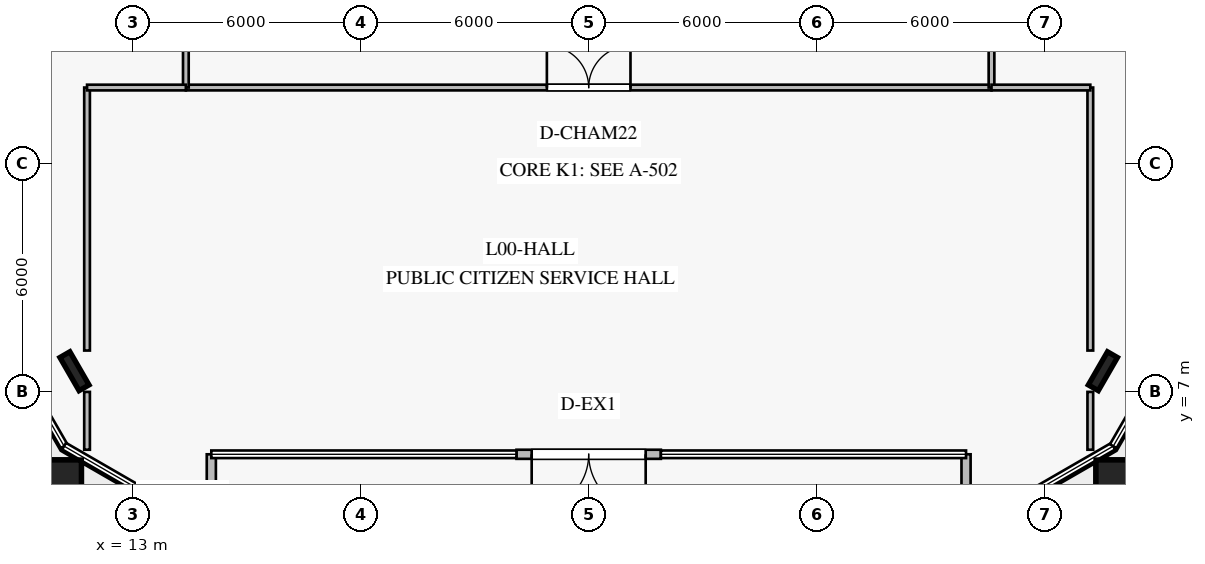
"""IFC4 building model, lengths in metres.
Left out: names, types, materials, properties, quantities, classifications, styles, units other than length and angle.
Written with IfcOpenShell. Run it as: python <this file> out.ifc"""

import sys

from ifc_helpers import new_model, si_unit, direction, frame, frame_2d, origin, origin_2d, place, context, subcontext, project, spatial, rectangle, i_section, extrude, element, fill, save


model = new_model("IFC4")
c1 = context("Model", 3, precision=1e-05, world=origin(), true_north=direction((0.0, 1.0)))
c2 = subcontext(c1, "Body", "Model", "MODEL_VIEW")
j1 = project(units=[si_unit("LENGTHUNIT", "METRE"), si_unit("PLANEANGLEUNIT", "RADIAN")], contexts=[c1])
p1 = place(None, origin())
s1 = spatial("IfcSite", under=j1, at=p1, CompositionType="ELEMENT")
p2 = place(p1, origin())
s2 = spatial("IfcBuilding", under=s1, at=p2, CompositionType="ELEMENT")
p3 = place(p2, origin())
s3 = spatial("IfcBuildingStorey", under=s2, at=p3, CompositionType="ELEMENT", Elevation=0.0)
for number, where, z_axis, x_axis in (
    (1, (11.469, 7.536, 0.0), (0.0, 0.0, 1.0), (-0.5, 0.866, 0.0)),
    (2, (38.531, 7.536, 0.0), (0.0, 0.0, 1.0), (0.5, 0.866, 0.0)),
):
    element("IfcColumn", number, at=place(p3, frame(where, z_axis=z_axis, x_axis=x_axis)), inside=s3, PredefinedType="COLUMN", context=c2, shape_type="SweptSolid", body=[
        extrude(i_section(OverallWidth=0.302, OverallDepth=1.008, WebThickness=0.021, FlangeThickness=0.04, at=origin_2d()), origin(), (0.0, 0.0, 1.0), 5.2),
    ])
for number, where, z_axis, x_axis in (
    (3, (11.0, 4.55, 0.0), (0.0, 0.0, 1.0), (1.0, 0.0, 0.0)),
    (4, (39.0, 4.55, 0.0), (0.0, 0.0, 1.0), (1.0, 0.0, 0.0)),
):
    element("IfcColumn", number, at=place(p3, frame(where, z_axis=z_axis, x_axis=x_axis)), inside=s3, PredefinedType="COLUMN", context=c2, shape_type="SweptSolid", body=[
        extrude(rectangle(XDim=1.3, YDim=1.3, at=origin_2d()), origin(), (0.0, 0.0, 1.0), 5.2),
    ])
p4 = place(p3, frame((23.1, 5.35, 0.0), z_axis=(0.0, 0.0, 1.0), x_axis=(1.0, 0.0, 0.0)))
e5 = element("IfcWall", 5, at=p4, inside=s3, PredefinedType="STANDARD", context=c2, shape_type="SweptSolid", body=[
    extrude(rectangle(XDim=3.8, YDim=0.24, at=frame_2d((1.9, 0.0))), origin(), (0.0, 0.0, 1.0), 4.94),
])
p5 = place(p4, frame((0.4, 0.0, 0.0)))
e6 = element("IfcOpeningElement", 6, at=p5, cuts=e5, PredefinedType="OPENING", context=c2, shape_type="SweptSolid", body=[
    extrude(rectangle(XDim=3.0, YDim=2.8, at=frame_2d((1.5, 1.4))), frame((0.0, 0.13, 0.0), z_axis=(0.0, -1.0, 0.0), x_axis=(1.0, 0.0, 0.0)), (0.0, 0.0, 1.0), 0.26),
])
for number, where, z_axis, x_axis in (
    (7, (15.07, 3.327, 0.0), (0.0, 0.0, 1.0), (0.0, 1.0, 0.0)),
    (8, (34.93, 5.35, 0.0), (0.0, 0.0, 1.0), (0.0, -1.0, 0.0)),
):
    element("IfcWall", number, at=place(p3, frame(where, z_axis=z_axis, x_axis=x_axis)), inside=s3, PredefinedType="STANDARD", context=c2, shape_type="SweptSolid", body=[
        extrude(rectangle(XDim=2.023, YDim=0.24, at=frame_2d((1.012, 0.0))), origin(), (0.0, 0.0, 1.0), 4.94),
    ])
p6 = place(p3, frame((14.4, 15.0, 0.0), z_axis=(0.0, 0.0, 1.0), x_axis=(1.0, 0.0, 0.0)))
e9 = element("IfcWall", 9, at=p6, inside=s3, PredefinedType="PARTITIONING", context=c2, shape_type="SweptSolid", body=[
    extrude(rectangle(XDim=21.2, YDim=0.15, at=frame_2d((10.6, 0.0))), origin(), (0.0, 0.0, 1.0), 4.39),
])
p7 = place(p6, frame((9.5, 0.0, 0.0)))
e10 = element("IfcOpeningElement", 10, at=p7, cuts=e9, PredefinedType="OPENING", context=c2, shape_type="SweptSolid", body=[
    extrude(rectangle(XDim=2.2, YDim=2.4, at=frame_2d((1.1, 1.2))), frame((0.0, 0.085, 0.0), z_axis=(0.0, -1.0, 0.0), x_axis=(1.0, 0.0, 0.0)), (0.0, 0.0, 1.0), 0.17),
])
p8 = place(p3, frame((14.4, 15.0, 0.0), z_axis=(0.0, 0.0, 1.0), x_axis=(0.0, 1.0, 0.0)))
e11 = element("IfcWall", 11, at=p8, inside=s3, PredefinedType="PARTITIONING", context=c2, shape_type="SweptSolid", body=[
    extrude(rectangle(XDim=6.25, YDim=0.15, at=frame_2d((3.125, 0.0))), origin(), (0.0, 0.0, 1.0), 4.39),
])
p9 = place(p8, frame((2.486, 0.0, 0.0)))
e12 = element("IfcOpeningElement", 12, at=p9, cuts=e11, PredefinedType="OPENING", context=c2, shape_type="SweptSolid", body=[
    extrude(rectangle(XDim=1.1, YDim=2.2, at=frame_2d((0.55, 1.1))), frame((0.0, 0.085, 0.0), z_axis=(0.0, -1.0, 0.0), x_axis=(1.0, 0.0, 0.0)), (0.0, 0.0, 1.0), 0.17),
])
p10 = place(p3, frame((35.6, 15.0, 0.0), z_axis=(0.0, 0.0, 1.0), x_axis=(0.0, 1.0, 0.0)))
e13 = element("IfcWall", 13, at=p10, inside=s3, PredefinedType="PARTITIONING", context=c2, shape_type="SweptSolid", body=[
    extrude(rectangle(XDim=6.25, YDim=0.15, at=frame_2d((3.125, 0.0))), origin(), (0.0, 0.0, 1.0), 4.94),
])
p11 = place(p10, frame((2.486, 0.0, 0.0)))
e14 = element("IfcOpeningElement", 14, at=p11, cuts=e13, PredefinedType="OPENING", context=c2, shape_type="SweptSolid", body=[
    extrude(rectangle(XDim=1.1, YDim=2.2, at=frame_2d((0.55, 1.1))), frame((0.0, 0.085, 0.0), z_axis=(0.0, -1.0, 0.0), x_axis=(1.0, 0.0, 0.0)), (0.0, 0.0, 1.0), 0.17),
])
p12 = place(p3, frame((11.8, 5.47, 0.0), z_axis=(0.0, 0.0, 1.0), x_axis=(0.0, 1.0, 0.0)))
e15 = element("IfcWall", 15, at=p12, inside=s3, PredefinedType="PARTITIONING", context=c2, shape_type="SweptSolid", body=[
    extrude(rectangle(XDim=1.522, YDim=0.15, at=frame_2d((0.761, 0.0))), origin(), (0.0, 0.0, 1.0), 4.39),
])
p13 = place(p3, frame((11.8, 8.08, 0.0), z_axis=(0.0, 0.0, 1.0), x_axis=(0.0, 1.0, 0.0)))
e16 = element("IfcWall", 16, at=p13, inside=s3, PredefinedType="PARTITIONING", context=c2, shape_type="SweptSolid", body=[
    extrude(rectangle(XDim=6.92, YDim=0.15, at=frame_2d((3.46, 0.0))), origin(), (0.0, 0.0, 1.0), 4.39),
])
p14 = place(p3, frame((38.2, 5.47, 0.0), z_axis=(0.0, 0.0, 1.0), x_axis=(0.0, 1.0, 0.0)))
e17 = element("IfcWall", 17, at=p14, inside=s3, PredefinedType="PARTITIONING", context=c2, shape_type="SweptSolid", body=[
    extrude(rectangle(XDim=1.522, YDim=0.15, at=frame_2d((0.761, 0.0))), origin(), (0.0, 0.0, 1.0), 4.39),
])
p15 = place(p3, frame((38.2, 8.08, 0.0), z_axis=(0.0, 0.0, 1.0), x_axis=(0.0, 1.0, 0.0)))
e18 = element("IfcWall", 18, at=p15, inside=s3, PredefinedType="PARTITIONING", context=c2, shape_type="SweptSolid", body=[
    extrude(rectangle(XDim=6.92, YDim=0.15, at=frame_2d((3.46, 0.0))), origin(), (0.0, 0.0, 1.0), 4.39),
])
for number, where, z_axis, x_axis in (
    (19, (11.8, 15.0, 0.0), (0.0, 0.0, 1.0), (1.0, 0.0, 0.0)),
    (20, (35.6, 15.0, 0.0), (0.0, 0.0, 1.0), (1.0, 0.0, 0.0)),
):
    element("IfcWall", number, at=place(p3, frame(where, z_axis=z_axis, x_axis=x_axis)), inside=s3, PredefinedType="PARTITIONING", context=c2, shape_type="SweptSolid", body=[
        extrude(rectangle(XDim=2.6, YDim=0.15, at=frame_2d((1.3, 0.0))), origin(), (0.0, 0.0, 1.0), 4.94),
    ])
p16 = place(p5, frame((3.0, 0.0, 0.0), z_axis=(0.0, 0.0, 1.0), x_axis=(-1.0, 0.0, 0.0)))
e21 = element("IfcDoor", 21, at=p16, inside=s3, OperationType="DOUBLE_DOOR_SINGLE_SWING", PredefinedType="DOOR", context=c2, shape_type="SweptSolid", body=[
    extrude(rectangle(XDim=3.0, YDim=2.8, at=frame_2d((1.5, 1.4))), frame((0.0, 0.025, 0.0), z_axis=(0.0, -1.0, 0.0), x_axis=(1.0, 0.0, 0.0)), (0.0, 0.0, 1.0), 0.05),
])
fill(e6, e21)
p17 = place(p7, origin())
e22 = element("IfcDoor", 22, at=p17, inside=s3, OperationType="DOUBLE_DOOR_SINGLE_SWING", PredefinedType="DOOR", context=c2, shape_type="SweptSolid", body=[
    extrude(rectangle(XDim=2.2, YDim=2.4, at=frame_2d((1.1, 1.2))), frame((0.0, 0.025, 0.0), z_axis=(0.0, -1.0, 0.0), x_axis=(1.0, 0.0, 0.0)), (0.0, 0.0, 1.0), 0.05),
])
fill(e10, e22)
save(model, sys.argv[1])
